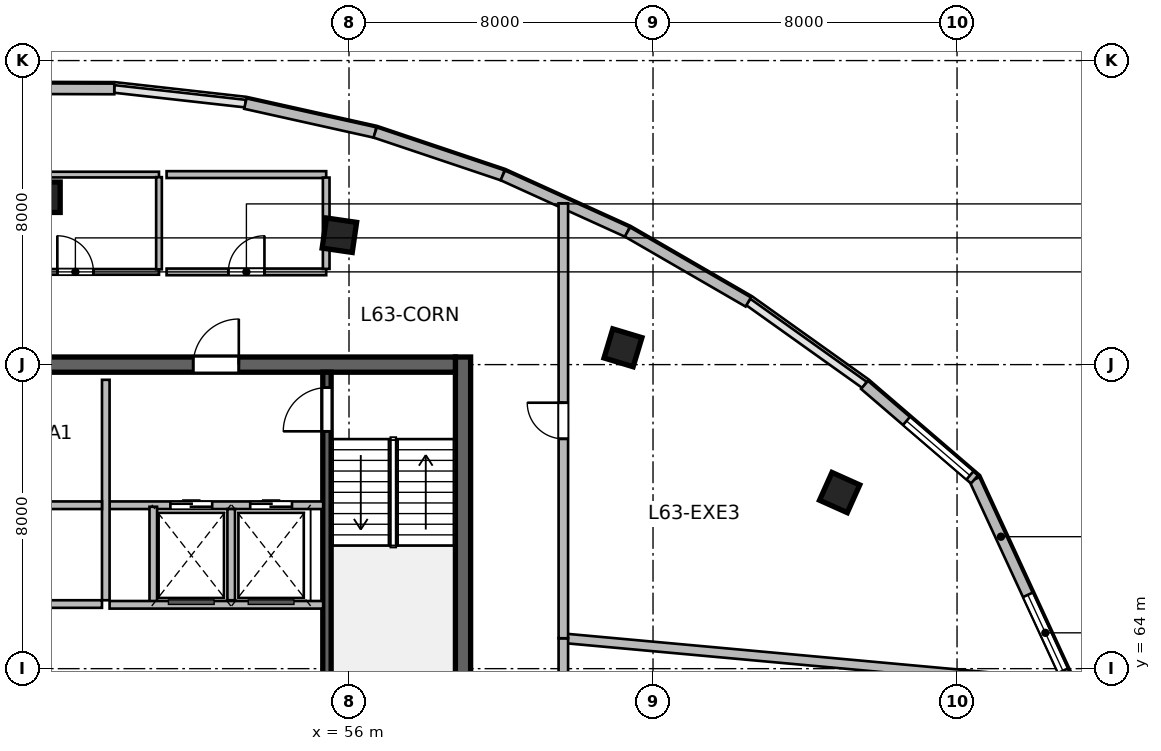
"""IFC4 building model, lengths in metres.
Left out: names, types, materials, properties, quantities, classifications, styles, units other than length and angle.
Written with IfcOpenShell. Run it as: python <this file> out.ifc"""

import sys

from ifc_helpers import new_model, si_unit, direction, frame, frame_2d, origin, origin_2d, place, context, subcontext, project, spatial, rectangle, extrude, source, transform, mapped, element, fill, save


model = new_model("IFC4")
c1 = context("Model", 3, precision=1e-05, world=origin(), true_north=direction((0.0, 1.0)))
c2 = subcontext(c1, "Body", "Model", "MODEL_VIEW")
j1 = project(units=[si_unit("LENGTHUNIT", "METRE"), si_unit("PLANEANGLEUNIT", "RADIAN")], contexts=[c1])
p1 = place(None, origin())
s1 = spatial("IfcSite", under=j1, at=p1, CompositionType="ELEMENT")
p2 = place(p1, origin())
s2 = spatial("IfcBuilding", under=s1, at=p2, CompositionType="ELEMENT")
p3 = place(p2, frame((0.0, 0.0, 260.1)))
s3 = spatial("IfcBuildingStorey", under=s2, at=p3, CompositionType="ELEMENT", Elevation=260.1)
m1 = source(origin(), c2, "Body", "SweptSolid", [
    extrude(rectangle(XDim=12.0, YDim=0.4, at=frame_2d((6.0, 0.0))), origin(), (0.0, 0.0, 1.0), 3.9),
])
p4 = place(p3, frame((59.0, 60.2, 0.0), z_axis=(0.0, 0.0, 1.0), x_axis=(0.0, 1.0, 0.0)))
e1 = element("IfcWall", 1, at=p4, inside=s3, PredefinedType="SHEAR", context=c2, shape_type="MappedRepresentation", body=[
    mapped(m1, transform((0.0, 0.0, 0.0), scale=1.0)),
])
m2 = source(origin(), c2, "Body", "SweptSolid", [
    extrude(rectangle(XDim=21.6, YDim=0.4, at=frame_2d((10.8, 0.0))), origin(), (0.0, 0.0, 1.0), 3.9),
])
p5 = place(p3, frame((37.2, 72.0, 0.0), z_axis=(0.0, 0.0, 1.0), x_axis=(1.0, 0.0, 0.0)))
e2 = element("IfcWall", 2, at=p5, inside=s3, PredefinedType="SHEAR", context=c2, shape_type="MappedRepresentation", body=[
    mapped(m2, transform((0.0, 0.0, 0.0), scale=1.0)),
])
p6 = place(p5, frame((1.2, 0.0, 0.0)))
e3 = element("IfcOpeningElement", 3, at=p6, cuts=e2, PredefinedType="OPENING", context=c2, shape_type="SweptSolid", body=[
    extrude(rectangle(XDim=0.9, YDim=2.1, at=frame_2d((0.45, 1.05))), frame((0.0, 0.21, 0.0), z_axis=(0.0, -1.0, 0.0), x_axis=(1.0, 0.0, 0.0)), (0.0, 0.0, 1.0), 0.42),
])
p7 = place(p5, frame((14.7, 0.0, 0.0)))
e4 = element("IfcOpeningElement", 4, at=p7, cuts=e2, PredefinedType="OPENING", context=c2, shape_type="SweptSolid", body=[
    extrude(rectangle(XDim=1.2, YDim=2.15, at=frame_2d((0.6, 1.075))), frame((0.0, 0.21, 0.0), z_axis=(0.0, -1.0, 0.0), x_axis=(1.0, 0.0, 0.0)), (0.0, 0.0, 1.0), 0.42),
])
p8 = place(p5, frame((4.15, 0.0, 0.0)))
e5 = element("IfcOpeningElement", 5, at=p8, cuts=e2, PredefinedType="OPENING", context=c2, shape_type="SweptSolid", body=[
    extrude(rectangle(XDim=1.3, YDim=2.15, at=frame_2d((0.65, 1.075))), frame((0.0, 0.21, 0.0), z_axis=(0.0, -1.0, 0.0), x_axis=(1.0, 0.0, 0.0)), (0.0, 0.0, 1.0), 0.42),
])
p9 = place(p5, frame((7.1, 0.0, 0.0)))
e6 = element("IfcOpeningElement", 6, at=p9, cuts=e2, PredefinedType="OPENING", context=c2, shape_type="SweptSolid", body=[
    extrude(rectangle(XDim=0.9, YDim=2.1, at=frame_2d((0.45, 1.05))), frame((0.0, 0.21, 0.0), z_axis=(0.0, -1.0, 0.0), x_axis=(1.0, 0.0, 0.0)), (0.0, 0.0, 1.0), 0.42),
])
m3 = source(origin(), c2, "Body", "SweptSolid", [
    extrude(rectangle(XDim=11.2, YDim=0.22, at=frame_2d((5.6, 0.0))), origin(), (0.0, 0.0, 1.0), 3.9),
])
p10 = place(p3, frame((55.42, 60.6, 0.0), z_axis=(0.0, 0.0, 1.0), x_axis=(0.0, 1.0, 0.0)))
e7 = element("IfcWall", 7, at=p10, inside=s3, PredefinedType="SHEAR", context=c2, shape_type="MappedRepresentation", body=[
    mapped(m3, transform((0.0, 0.0, 0.0), scale=1.0)),
])
p11 = place(p10, frame((9.645, 0.0, 0.0)))
e8 = element("IfcOpeningElement", 8, at=p11, cuts=e7, PredefinedType="OPENING", context=c2, shape_type="SweptSolid", body=[
    extrude(rectangle(XDim=1.15, YDim=2.15, at=frame_2d((0.575, 1.075))), frame((0.0, 0.12, 0.0), z_axis=(0.0, -1.0, 0.0), x_axis=(1.0, 0.0, 0.0)), (0.0, 0.0, 1.0), 0.24),
])
m4 = source(origin(), c2, "Body", "SweptSolid", [
    extrude(rectangle(XDim=0.8, YDim=0.8, at=origin_2d()), origin(), (0.0, 0.0, 1.0), 3.9),
])
for number, where, z_axis, x_axis in (
    (9, (48.0, 76.404, 0.0), (0.0, 0.0, 1.0), (0.0, 1.0, 0.0)),
    (10, (55.747, 75.404, 0.0), (0.0, 0.0, 1.0), (0.143, 0.99, 0.0)),
    (11, (63.209, 72.442, 0.0), (0.0, 0.0, 1.0), (0.289, 0.957, 0.0)),
    (12, (68.91, 68.633, 0.0), (0.0, 0.0, 1.0), (0.409, 0.912, 0.0)),
):
    element("IfcColumn", number, at=place(p3, frame(where, z_axis=z_axis, x_axis=x_axis)), inside=s3, PredefinedType="COLUMN", context=c2, shape_type="MappedRepresentation", body=[
        mapped(m4, transform((0.0, 0.0, 0.0), scale=1.0)),
    ])
m5 = source(origin(), c2, "Body", "SweptSolid", [
    extrude(rectangle(XDim=5.928, YDim=0.28, at=frame_2d((2.964, 0.0))), origin(), (0.0, 0.0, 1.0), 3.65),
])
p12 = place(p3, frame((72.459, 68.979, 0.0), z_axis=(0.0, 0.0, 1.0), x_axis=(0.41942378221, -0.907790554543, 0.0)))
e13 = element("IfcWall", 13, at=p12, inside=s3, PredefinedType="SOLIDWALL", context=c2, shape_type="MappedRepresentation", body=[
    mapped(m5, transform((0.0, 0.0, 0.0), scale=1.0)),
])
p13 = place(p12, frame((3.346, 0.0, 0.95)))
e14 = element("IfcOpeningElement", 14, at=p13, cuts=e13, PredefinedType="OPENING", context=c2, shape_type="SweptSolid", body=[
    extrude(rectangle(XDim=2.2, YDim=2.1, at=frame_2d((1.1, 1.05))), frame((0.0, 0.15, 0.0), z_axis=(0.0, -1.0, 0.0), x_axis=(1.0, 0.0, 0.0)), (0.0, 0.0, 1.0), 0.3),
])
m6 = source(origin(), c2, "Body", "SweptSolid", [
    extrude(rectangle(XDim=3.461, YDim=0.28, at=frame_2d((1.73, 0.0))), origin(), (0.0, 0.0, 1.0), 3.65),
])
p14 = place(p3, frame((46.363, 79.264, 0.0), z_axis=(0.0, 0.0, 1.0), x_axis=(0.999995611073, -0.002962740947, 0.0)))
e15 = element("IfcWall", 15, at=p14, inside=s3, PredefinedType="SOLIDWALL", context=c2, shape_type="MappedRepresentation", body=[
    mapped(m6, transform((0.0, 0.0, 0.0), scale=1.0)),
])
m7 = source(origin(), c2, "Body", "SweptSolid", [
    extrude(rectangle(XDim=3.499, YDim=0.28, at=frame_2d((1.749, 0.0))), origin(), (0.0, 0.0, 1.0), 3.65),
])
p15 = place(p3, frame((53.273, 78.867, 0.0), z_axis=(0.0, 0.0, 1.0), x_axis=(0.976149279518, -0.217100400957, 0.0)))
e16 = element("IfcWall", 16, at=p15, inside=s3, PredefinedType="SOLIDWALL", context=c2, shape_type="MappedRepresentation", body=[
    mapped(m7, transform((0.0, 0.0, 0.0), scale=1.0)),
])
m8 = source(origin(), c2, "Body", "SweptSolid", [
    extrude(rectangle(XDim=3.543, YDim=0.28, at=frame_2d((1.771, 0.0))), origin(), (0.0, 0.0, 1.0), 3.65),
])
p16 = place(p3, frame((56.688, 78.108, 0.0), z_axis=(0.0, 0.0, 1.0), x_axis=(0.947922565312, -0.318500879389, 0.0)))
e17 = element("IfcWall", 17, at=p16, inside=s3, PredefinedType="SOLIDWALL", context=c2, shape_type="MappedRepresentation", body=[
    mapped(m8, transform((0.0, 0.0, 0.0), scale=1.0)),
])
m9 = source(origin(), c2, "Body", "SweptSolid", [
    extrude(rectangle(XDim=3.603, YDim=0.28, at=frame_2d((1.801, 0.0))), origin(), (0.0, 0.0, 1.0), 3.65),
])
p17 = place(p3, frame((60.046, 76.979, 0.0), z_axis=(0.0, 0.0, 1.0), x_axis=(0.910463926817, -0.413588488676, 0.0)))
e18 = element("IfcWall", 18, at=p17, inside=s3, PredefinedType="SOLIDWALL", context=c2, shape_type="MappedRepresentation", body=[
    mapped(m9, transform((0.0, 0.0, 0.0), scale=1.0)),
])
m10 = source(origin(), c2, "Body", "SweptSolid", [
    extrude(rectangle(XDim=3.675, YDim=0.28, at=frame_2d((1.837, 0.0))), origin(), (0.0, 0.0, 1.0), 3.65),
])
p18 = place(p3, frame((63.326, 75.49, 0.0), z_axis=(0.0, 0.0, 1.0), x_axis=(0.865333783584, -0.501196012542, 0.0)))
e19 = element("IfcWall", 19, at=p18, inside=s3, PredefinedType="SOLIDWALL", context=c2, shape_type="MappedRepresentation", body=[
    mapped(m10, transform((0.0, 0.0, 0.0), scale=1.0)),
])
m11 = source(origin(), c2, "Body", "SweptSolid", [
    extrude(rectangle(XDim=3.816, YDim=0.28, at=frame_2d((1.908, 0.0))), origin(), (0.0, 0.0, 1.0), 3.65),
])
p19 = place(p3, frame((69.565, 71.466, 0.0), z_axis=(0.0, 0.0, 1.0), x_axis=(0.758388845672, -0.651802392417, 0.0)))
e20 = element("IfcWall", 20, at=p19, inside=s3, PredefinedType="SOLIDWALL", context=c2, shape_type="MappedRepresentation", body=[
    mapped(m11, transform((0.0, 0.0, 0.0), scale=1.0)),
])
p20 = place(p19, frame((1.456, 0.0, 0.95)))
e21 = element("IfcOpeningElement", 21, at=p20, cuts=e20, PredefinedType="OPENING", context=c2, shape_type="SweptSolid", body=[
    extrude(rectangle(XDim=2.2, YDim=2.1, at=frame_2d((1.1, 1.05))), frame((0.0, 0.15, 0.0), z_axis=(0.0, -1.0, 0.0), x_axis=(1.0, 0.0, 0.0)), (0.0, 0.0, 1.0), 0.3),
])
m12 = source(origin(), c2, "Body", "SweptSolid", [
    extrude(rectangle(XDim=5.62, YDim=0.2, at=frame_2d((2.81, 0.0))), origin(), (0.0, 0.0, 1.0), 3.65),
])
p21 = place(p3, frame((49.7, 68.3, 0.0), z_axis=(0.0, 0.0, 1.0), x_axis=(1.0, 0.0, 0.0)))
e22 = element("IfcWall", 22, at=p21, inside=s3, PredefinedType="SOLIDWALL", context=c2, shape_type="MappedRepresentation", body=[
    mapped(m12, transform((0.0, 0.0, 0.0), scale=1.0)),
])
p22 = place(p21, frame((1.6, 0.0, 0.0)))
e23 = element("IfcOpeningElement", 23, at=p22, cuts=e22, PredefinedType="OPENING", context=c2, shape_type="SweptSolid", body=[
    extrude(rectangle(XDim=1.1, YDim=2.15, at=frame_2d((0.55, 1.075))), frame((0.0, 0.11, 0.0), z_axis=(0.0, -1.0, 0.0), x_axis=(1.0, 0.0, 0.0)), (0.0, 0.0, 1.0), 0.22),
])
p23 = place(p21, frame((3.7, 0.0, 0.0)))
e24 = element("IfcOpeningElement", 24, at=p23, cuts=e22, PredefinedType="OPENING", context=c2, shape_type="SweptSolid", body=[
    extrude(rectangle(XDim=1.1, YDim=2.15, at=frame_2d((0.55, 1.075))), frame((0.0, 0.11, 0.0), z_axis=(0.0, -1.0, 0.0), x_axis=(1.0, 0.0, 0.0)), (0.0, 0.0, 1.0), 0.22),
])
m13 = source(origin(), c2, "Body", "SweptSolid", [
    extrude(rectangle(XDim=5.8, YDim=0.2, at=frame_2d((2.9, 0.0))), origin(), (0.0, 0.0, 1.0), 3.65),
])
p24 = place(p3, frame((49.6, 65.8, 0.0), z_axis=(0.0, 0.0, 1.0), x_axis=(0.0, 1.0, 0.0)))
e25 = element("IfcWall", 25, at=p24, inside=s3, PredefinedType="SOLIDWALL", context=c2, shape_type="MappedRepresentation", body=[
    mapped(m13, transform((0.0, 0.0, 0.0), scale=1.0)),
])
m14 = source(origin(), c2, "Body", "SweptSolid", [
    extrude(rectangle(XDim=2.58, YDim=0.2, at=frame_2d((1.29, 0.0))), origin(), (0.0, 0.0, 1.0), 3.65),
])
p25 = place(p3, frame((50.85, 65.68, 0.0), z_axis=(0.0, 0.0, 1.0), x_axis=(0.0, 1.0, 0.0)))
e26 = element("IfcWall", 26, at=p25, inside=s3, PredefinedType="SOLIDWALL", context=c2, shape_type="MappedRepresentation", body=[
    mapped(m14, transform((0.0, 0.0, 0.0), scale=1.0)),
])
m15 = source(origin(), c2, "Body", "SweptSolid", [
    extrude(rectangle(XDim=2.4, YDim=0.2, at=frame_2d((1.2, 0.0))), origin(), (0.0, 0.0, 1.0), 3.65),
])
p26 = place(p3, frame((52.9, 65.8, 0.0), z_axis=(0.0, 0.0, 1.0), x_axis=(0.0, 1.0, 0.0)))
e27 = element("IfcWall", 27, at=p26, inside=s3, PredefinedType="SOLIDWALL", context=c2, shape_type="MappedRepresentation", body=[
    mapped(m15, transform((0.0, 0.0, 0.0), scale=1.0)),
])
p27 = place(p3, frame((49.7, 65.68, 0.0), z_axis=(0.0, 0.0, 1.0), x_axis=(1.0, 0.0, 0.0)))
e28 = element("IfcWall", 28, at=p27, inside=s3, PredefinedType="SOLIDWALL", context=c2, shape_type="MappedRepresentation", body=[
    mapped(m12, transform((0.0, 0.0, 0.0), scale=1.0)),
])
m16 = source(origin(), c2, "Body", "SweptSolid", [
    extrude(rectangle(XDim=8.8, YDim=0.2, at=frame_2d((4.4, 0.0))), origin(), (0.0, 0.0, 1.0), 3.65),
])
p28 = place(p3, frame((40.7, 68.3, 0.0), z_axis=(0.0, 0.0, 1.0), x_axis=(1.0, 0.0, 0.0)))
e29 = element("IfcWall", 29, at=p28, inside=s3, PredefinedType="SOLIDWALL", context=c2, shape_type="MappedRepresentation", body=[
    mapped(m16, transform((0.0, 0.0, 0.0), scale=1.0)),
])
p29 = place(p3, frame((40.7, 65.7, 0.0), z_axis=(0.0, 0.0, 1.0), x_axis=(1.0, 0.0, 0.0)))
e30 = element("IfcWall", 30, at=p29, inside=s3, PredefinedType="SOLIDWALL", context=c2, shape_type="MappedRepresentation", body=[
    mapped(m16, transform((0.0, 0.0, 0.0), scale=1.0)),
])
p30 = place(p29, frame((3.8, 0.0, 0.0)))
e31 = element("IfcOpeningElement", 31, at=p30, cuts=e30, PredefinedType="OPENING", context=c2, shape_type="SweptSolid", body=[
    extrude(rectangle(XDim=0.95, YDim=2.15, at=frame_2d((0.475, 1.075))), frame((0.0, 0.11, 0.0), z_axis=(0.0, -1.0, 0.0), x_axis=(1.0, 0.0, 0.0)), (0.0, 0.0, 1.0), 0.22),
])
m17 = source(origin(), c2, "Body", "SweptSolid", [
    extrude(rectangle(XDim=4.4, YDim=0.15, at=frame_2d((2.2, 0.0))), origin(), (0.0, 0.0, 1.0), 3.65),
])
p31 = place(p3, frame((46.6, 74.44, 0.0), z_axis=(0.0, 0.0, 1.0), x_axis=(1.0, 0.0, 0.0)))
e32 = element("IfcWall", 32, at=p31, inside=s3, PredefinedType="PARTITIONING", context=c2, shape_type="MappedRepresentation", body=[
    mapped(m17, transform((0.0, 0.0, 0.0), scale=1.0)),
])
p32 = place(p31, frame((1.725, 0.0, 0.0)))
e33 = element("IfcOpeningElement", 33, at=p32, cuts=e32, PredefinedType="OPENING", context=c2, shape_type="SweptSolid", body=[
    extrude(rectangle(XDim=0.95, YDim=2.1, at=frame_2d((0.475, 1.05))), frame((0.0, 0.085, 0.0), z_axis=(0.0, -1.0, 0.0), x_axis=(1.0, 0.0, 0.0)), (0.0, 0.0, 1.0), 0.17),
])
p33 = place(p3, frame((46.6, 77.0, 0.0), z_axis=(0.0, 0.0, 1.0), x_axis=(1.0, 0.0, 0.0)))
e34 = element("IfcWall", 34, at=p33, inside=s3, PredefinedType="PARTITIONING", context=c2, shape_type="MappedRepresentation", body=[
    mapped(m17, transform((0.0, 0.0, 0.0), scale=1.0)),
])
m18 = source(origin(), c2, "Body", "SweptSolid", [
    extrude(rectangle(XDim=2.425, YDim=0.15, at=frame_2d((1.212, 0.0))), origin(), (0.0, 0.0, 1.0), 3.65),
])
p34 = place(p3, frame((51.0, 74.508, 0.0), z_axis=(0.0, 0.0, 1.0), x_axis=(0.0, 1.0, 0.0)))
e35 = element("IfcWall", 35, at=p34, inside=s3, PredefinedType="PARTITIONING", context=c2, shape_type="MappedRepresentation", body=[
    mapped(m18, transform((0.0, 0.0, 0.0), scale=1.0)),
])
m19 = source(origin(), c2, "Body", "SweptSolid", [
    extrude(rectangle(XDim=4.2, YDim=0.175, at=frame_2d((2.1, 0.0))), origin(), (0.0, 0.0, 1.0), 3.65),
])
p35 = place(p3, frame((51.2, 74.44, 0.0), z_axis=(0.0, 0.0, 1.0), x_axis=(1.0, 0.0, 0.0)))
e36 = element("IfcWall", 36, at=p35, inside=s3, PredefinedType="PARTITIONING", context=c2, shape_type="MappedRepresentation", body=[
    mapped(m19, transform((0.0, 0.0, 0.0), scale=1.0)),
])
p36 = place(p35, frame((1.625, 0.0, 0.0)))
e37 = element("IfcOpeningElement", 37, at=p36, cuts=e36, PredefinedType="OPENING", context=c2, shape_type="SweptSolid", body=[
    extrude(rectangle(XDim=0.95, YDim=2.12, at=frame_2d((0.475, 1.06))), frame((0.0, 0.098, 0.0), z_axis=(0.0, -1.0, 0.0), x_axis=(1.0, 0.0, 0.0)), (0.0, 0.0, 1.0), 0.195),
])
m20 = source(origin(), c2, "Body", "SweptSolid", [
    extrude(rectangle(XDim=4.2, YDim=0.18, at=frame_2d((2.1, 0.0))), origin(), (0.0, 0.0, 1.0), 3.65),
])
p37 = place(p3, frame((51.2, 77.0, 0.0), z_axis=(0.0, 0.0, 1.0), x_axis=(1.0, 0.0, 0.0)))
e38 = element("IfcWall", 38, at=p37, inside=s3, PredefinedType="PLUMBINGWALL", context=c2, shape_type="MappedRepresentation", body=[
    mapped(m20, transform((0.0, 0.0, 0.0), scale=1.0)),
])
m21 = source(origin(), c2, "Body", "SweptSolid", [
    extrude(rectangle(XDim=2.403, YDim=0.175, at=frame_2d((1.201, 0.0))), origin(), (0.0, 0.0, 1.0), 3.65),
])
p38 = place(p3, frame((55.4, 74.519, 0.0), z_axis=(0.0, 0.0, 1.0), x_axis=(0.0, 1.0, 0.0)))
e39 = element("IfcWall", 39, at=p38, inside=s3, PredefinedType="PARTITIONING", context=c2, shape_type="MappedRepresentation", body=[
    mapped(m21, transform((0.0, 0.0, 0.0), scale=1.0)),
])
m22 = source(origin(), c2, "Body", "SweptSolid", [
    extrude(rectangle(XDim=13.228, YDim=0.25, at=frame_2d((6.614, 0.0))), origin(), (0.0, 0.0, 1.0), 3.65),
])
p39 = place(p3, frame((61.64, 64.8, 0.0), z_axis=(0.0, 0.0, 1.0), x_axis=(0.995868510157, -0.090806995755, 0.0)))
e40 = element("IfcWall", 40, at=p39, inside=s3, PredefinedType="PARTITIONING", context=c2, shape_type="MappedRepresentation", body=[
    mapped(m22, transform((0.0, 0.0, 0.0), scale=1.0)),
])
m23 = source(origin(), c2, "Body", "SweptSolid", [
    extrude(rectangle(XDim=3.8, YDim=0.25, at=frame_2d((1.9, 0.0))), origin(), (0.0, 0.0, 1.0), 3.65),
])
p40 = place(p3, frame((61.64, 61.0, 0.0), z_axis=(0.0, 0.0, 1.0), x_axis=(0.0, 1.0, 0.0)))
e41 = element("IfcWall", 41, at=p40, inside=s3, PredefinedType="PARTITIONING", context=c2, shape_type="MappedRepresentation", body=[
    mapped(m23, transform((0.0, 0.0, 0.0), scale=1.0)),
])
p41 = place(p40, frame((0.969, 0.0, 0.0)))
e42 = element("IfcOpeningElement", 42, at=p41, cuts=e41, PredefinedType="OPENING", context=c2, shape_type="SweptSolid", body=[
    extrude(rectangle(XDim=0.95, YDim=2.1, at=frame_2d((0.475, 1.05))), frame((0.0, 0.135, 0.0), z_axis=(0.0, -1.0, 0.0), x_axis=(1.0, 0.0, 0.0)), (0.0, 0.0, 1.0), 0.27),
])
m24 = source(origin(), c2, "Body", "SweptSolid", [
    extrude(rectangle(XDim=11.445, YDim=0.25, at=frame_2d((5.722, 0.0))), origin(), (0.0, 0.0, 1.0), 3.65),
])
p42 = place(p3, frame((61.64, 64.8, 0.0), z_axis=(0.0, 0.0, 1.0), x_axis=(0.0, 1.0, 0.0)))
e43 = element("IfcWall", 43, at=p42, inside=s3, PredefinedType="PARTITIONING", context=c2, shape_type="MappedRepresentation", body=[
    mapped(m24, transform((0.0, 0.0, 0.0), scale=1.0)),
])
p43 = place(p42, frame((5.247, 0.0, 0.0)))
e44 = element("IfcOpeningElement", 44, at=p43, cuts=e43, PredefinedType="OPENING", context=c2, shape_type="SweptSolid", body=[
    extrude(rectangle(XDim=0.95, YDim=2.1, at=frame_2d((0.475, 1.05))), frame((0.0, 0.135, 0.0), z_axis=(0.0, -1.0, 0.0), x_axis=(1.0, 0.0, 0.0)), (0.0, 0.0, 1.0), 0.27),
])
m25 = source(origin(), c2, "Body", "SweptSolid", [
    extrude(rectangle(XDim=2.2, YDim=2.1, at=frame_2d((1.1, 1.05))), frame((0.0, 0.03, 0.0), z_axis=(0.0, -1.0, 0.0), x_axis=(1.0, 0.0, 0.0)), (0.0, 0.0, 1.0), 0.06),
])
p44 = place(p13, origin())
e45 = element("IfcWindow", 45, at=p44, inside=s3, PartitioningType="TRIPLE_PANEL_VERTICAL", PredefinedType="WINDOW", context=c2, shape_type="MappedRepresentation", body=[
    mapped(m25, transform((0.0, 0.0, 0.0), scale=1.0)),
])
fill(e14, e45)
p45 = place(p20, origin())
e46 = element("IfcWindow", 46, at=p45, inside=s3, PartitioningType="TRIPLE_PANEL_VERTICAL", PredefinedType="WINDOW", context=c2, shape_type="MappedRepresentation", body=[
    mapped(m25, transform((0.0, 0.0, 0.0), scale=1.0)),
])
fill(e21, e46)
m26 = source(origin(), c2, "Body", "SweptSolid", [
    extrude(rectangle(XDim=1.15, YDim=2.15, at=frame_2d((0.575, 1.075))), frame((0.0, 0.025, 0.0), z_axis=(0.0, -1.0, 0.0), x_axis=(1.0, 0.0, 0.0)), (0.0, 0.0, 1.0), 0.05),
])
p46 = place(p11, origin())
e47 = element("IfcDoor", 47, at=p46, inside=s3, OperationType="SINGLE_SWING_LEFT", PredefinedType="DOOR", context=c2, shape_type="MappedRepresentation", body=[
    mapped(m26, transform((0.0, 0.0, 0.0), scale=1.0)),
])
fill(e8, e47)
m27 = source(origin(), c2, "Body", "SweptSolid", [
    extrude(rectangle(XDim=1.2, YDim=2.15, at=frame_2d((0.6, 1.075))), frame((0.0, 0.025, 0.0), z_axis=(0.0, -1.0, 0.0), x_axis=(1.0, 0.0, 0.0)), (0.0, 0.0, 1.0), 0.05),
])
p47 = place(p7, origin())
e48 = element("IfcDoor", 48, at=p47, inside=s3, OperationType="SINGLE_SWING_RIGHT", PredefinedType="DOOR", context=c2, shape_type="MappedRepresentation", body=[
    mapped(m27, transform((0.0, 0.0, 0.0), scale=1.0)),
])
fill(e4, e48)
m28 = source(origin(), c2, "Body", "SweptSolid", [
    extrude(rectangle(XDim=1.1, YDim=2.15, at=frame_2d((0.55, 1.075))), frame((0.0, 0.025, 0.0), z_axis=(0.0, -1.0, 0.0), x_axis=(1.0, 0.0, 0.0)), (0.0, 0.0, 1.0), 0.05),
])
p48 = place(p22, origin())
e49 = element("IfcDoor", 49, at=p48, inside=s3, OperationType="DOUBLE_DOOR_SLIDING", PredefinedType="DOOR", context=c2, shape_type="MappedRepresentation", body=[
    mapped(m28, transform((0.0, 0.0, 0.0), scale=1.0)),
])
fill(e23, e49)
p49 = place(p23, origin())
e50 = element("IfcDoor", 50, at=p49, inside=s3, OperationType="DOUBLE_DOOR_SLIDING", PredefinedType="DOOR", context=c2, shape_type="MappedRepresentation", body=[
    mapped(m28, transform((0.0, 0.0, 0.0), scale=1.0)),
])
fill(e24, e50)
m29 = source(origin(), c2, "Body", "SweptSolid", [
    extrude(rectangle(XDim=0.95, YDim=2.1, at=frame_2d((0.475, 1.05))), frame((0.0, 0.025, 0.0), z_axis=(0.0, -1.0, 0.0), x_axis=(1.0, 0.0, 0.0)), (0.0, 0.0, 1.0), 0.05),
])
p50 = place(p32, origin())
e51 = element("IfcDoor", 51, at=p50, inside=s3, OperationType="SINGLE_SWING_LEFT", PredefinedType="DOOR", context=c2, shape_type="MappedRepresentation", body=[
    mapped(m29, transform((0.0, 0.0, 0.0), scale=1.0)),
])
fill(e33, e51)
m30 = source(origin(), c2, "Body", "SweptSolid", [
    extrude(rectangle(XDim=0.95, YDim=2.12, at=frame_2d((0.475, 1.06))), frame((0.0, 0.025, 0.0), z_axis=(0.0, -1.0, 0.0), x_axis=(1.0, 0.0, 0.0)), (0.0, 0.0, 1.0), 0.05),
])
p51 = place(p36, origin())
e52 = element("IfcDoor", 52, at=p51, inside=s3, OperationType="SINGLE_SWING_RIGHT", PredefinedType="DOOR", context=c2, shape_type="MappedRepresentation", body=[
    mapped(m30, transform((0.0, 0.0, 0.0), scale=1.0)),
])
fill(e37, e52)
p52 = place(p43, origin())
e53 = element("IfcDoor", 53, at=p52, inside=s3, OperationType="SINGLE_SWING_RIGHT", PredefinedType="DOOR", context=c2, shape_type="MappedRepresentation", body=[
    mapped(m29, transform((0.0, 0.0, 0.0), scale=1.0)),
])
fill(e44, e53)
save(model, sys.argv[1])
